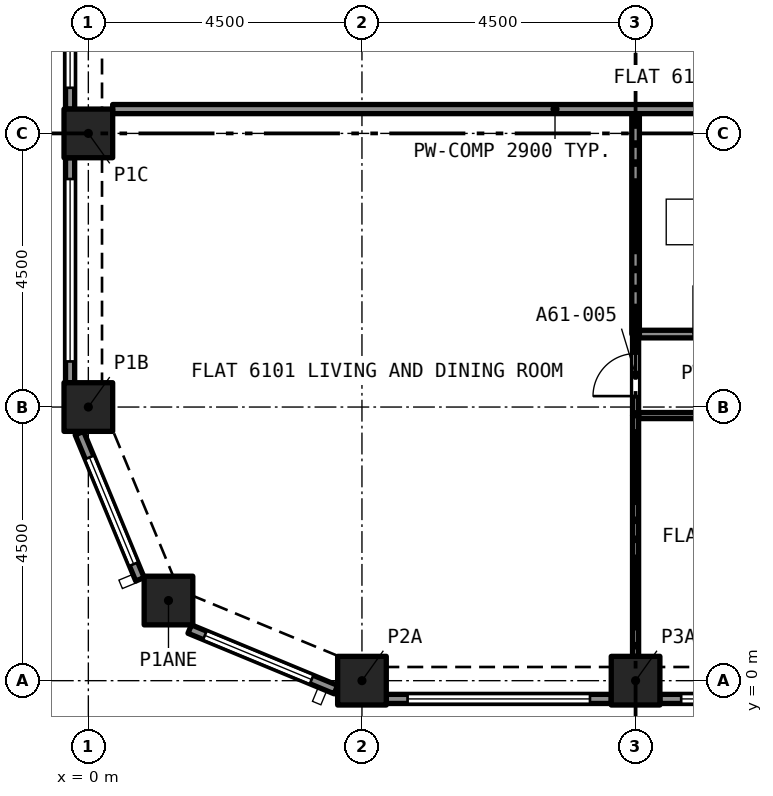
"""IFC4 building model, lengths in metres.
Left out: names, types, materials, properties, quantities, classifications, styles, units other than length and angle.
Written with IfcOpenShell. Run it as: python <this file> out.ifc"""

import sys

from ifc_helpers import new_model, si_unit, direction, frame, frame_2d, origin, origin_2d, place, context, subcontext, project, spatial, rectangle, extrude, element, fill, save


model = new_model("IFC4")
c1 = context("Model", 3, precision=1e-05, world=origin(), true_north=direction((0.0, 1.0)))
c2 = subcontext(c1, "Body", "Model", "MODEL_VIEW")
j1 = project(units=[si_unit("LENGTHUNIT", "METRE"), si_unit("PLANEANGLEUNIT", "RADIAN")], contexts=[c1])
p1 = place(None, origin())
s1 = spatial("IfcSite", under=j1, at=p1, CompositionType="ELEMENT")
p2 = place(p1, origin())
s2 = spatial("IfcBuilding", under=s1, at=p2, CompositionType="ELEMENT")
p3 = place(p2, frame((0.0, 0.0, 219.695)))
s3 = spatial("IfcBuildingStorey", under=s2, at=p3, CompositionType="ELEMENT", Elevation=219.695)
for number, where, z_axis, x_axis in (
    (1, (4.5, 0.0, 0.0), (0.0, 0.0, 1.0), (1.0, 0.0, 0.0)),
    (2, (9.0, 0.0, 0.0), (0.0, 0.0, 1.0), (1.0, 0.0, 0.0)),
    (3, (1.318, 1.318, 0.0), (0.0, 0.0, 1.0), (1.0, 0.0, 0.0)),
    (4, (0.0, 4.5, 0.0), (0.0, 0.0, 1.0), (1.0, 0.0, 0.0)),
    (5, (0.0, 9.0, 0.0), (0.0, 0.0, 1.0), (1.0, 0.0, 0.0)),
):
    element("IfcColumn", number, at=place(p3, frame(where, z_axis=z_axis, x_axis=x_axis)), inside=s3, PredefinedType="COLUMN", context=c2, shape_type="SweptSolid", body=[
        extrude(rectangle(XDim=0.8, YDim=0.8, at=origin_2d()), origin(), (0.0, 0.0, 1.0), 3.2),
    ])
p4 = place(p3, frame((-0.3, 9.4, 0.0), z_axis=(0.0, 0.0, 1.0), x_axis=(0.0, 1.0, 0.0)))
e6 = element("IfcWall", 6, at=p4, inside=s3, PredefinedType="SOLIDWALL", context=c2, shape_type="SweptSolid", body=[
    extrude(rectangle(XDim=3.7, YDim=0.15, at=frame_2d((1.85, 0.0))), origin(), (0.0, 0.0, 1.0), 3.2),
])
p5 = place(p4, frame((0.35, 0.0, 0.45)))
e7 = element("IfcOpeningElement", 7, at=p5, cuts=e6, PredefinedType="OPENING", context=c2, shape_type="SweptSolid", body=[
    extrude(rectangle(XDim=3.0, YDim=1.95, at=frame_2d((1.5, 0.975))), frame((0.0, 0.085, 0.0), z_axis=(0.0, -1.0, 0.0), x_axis=(1.0, 0.0, 0.0)), (0.0, 0.0, 1.0), 0.17),
])
p6 = place(p3, frame((-0.3, 4.9, 0.0), z_axis=(0.0, 0.0, 1.0), x_axis=(0.0, 1.0, 0.0)))
e8 = element("IfcWall", 8, at=p6, inside=s3, PredefinedType="SOLIDWALL", context=c2, shape_type="SweptSolid", body=[
    extrude(rectangle(XDim=3.7, YDim=0.15, at=frame_2d((1.85, 0.0))), origin(), (0.0, 0.0, 1.0), 3.2),
])
p7 = place(p6, frame((0.35, 0.0, 0.45)))
e9 = element("IfcOpeningElement", 9, at=p7, cuts=e8, PredefinedType="OPENING", context=c2, shape_type="SweptSolid", body=[
    extrude(rectangle(XDim=3.0, YDim=1.95, at=frame_2d((1.5, 0.975))), frame((0.0, 0.085, 0.0), z_axis=(0.0, -1.0, 0.0), x_axis=(1.0, 0.0, 0.0)), (0.0, 0.0, 1.0), 0.17),
])
p8 = place(p3, frame((0.849, 1.667, 0.0), z_axis=(0.0, 0.0, 1.0), x_axis=(-0.382669406082, 0.923885342263, 0.0)))
e10 = element("IfcWall", 10, at=p8, inside=s3, PredefinedType="SOLIDWALL", context=c2, shape_type="SweptSolid", body=[
    extrude(rectangle(XDim=2.602, YDim=0.15, at=frame_2d((1.301, 0.0))), origin(), (0.0, 0.0, 1.0), 3.2),
])
p9 = place(p8, frame((0.27, 0.0, 0.45)))
e11 = element("IfcOpeningElement", 11, at=p9, cuts=e10, PredefinedType="OPENING", context=c2, shape_type="SweptSolid", body=[
    extrude(rectangle(XDim=1.9, YDim=1.95, at=frame_2d((0.95, 0.975))), frame((0.0, 0.085, 0.0), z_axis=(0.0, -1.0, 0.0), x_axis=(1.0, 0.0, 0.0)), (0.0, 0.0, 1.0), 0.17),
])
p10 = place(p3, frame((4.071, -0.147, 0.0), z_axis=(0.0, 0.0, 1.0), x_axis=(-0.923885342263, 0.382669406082, 0.0)))
e12 = element("IfcWall", 12, at=p10, inside=s3, PredefinedType="SOLIDWALL", context=c2, shape_type="SweptSolid", body=[
    extrude(rectangle(XDim=2.602, YDim=0.15, at=frame_2d((1.301, 0.0))), origin(), (0.0, 0.0, 1.0), 3.2),
])
p11 = place(p10, frame((0.432, 0.0, 0.45)))
e13 = element("IfcOpeningElement", 13, at=p11, cuts=e12, PredefinedType="OPENING", context=c2, shape_type="SweptSolid", body=[
    extrude(rectangle(XDim=1.9, YDim=1.95, at=frame_2d((0.95, 0.975))), frame((0.0, 0.085, 0.0), z_axis=(0.0, -1.0, 0.0), x_axis=(1.0, 0.0, 0.0)), (0.0, 0.0, 1.0), 0.17),
])
p12 = place(p3, frame((8.6, -0.3, 0.0), z_axis=(0.0, 0.0, 1.0), x_axis=(-1.0, 0.0, 0.0)))
e14 = element("IfcWall", 14, at=p12, inside=s3, PredefinedType="SOLIDWALL", context=c2, shape_type="SweptSolid", body=[
    extrude(rectangle(XDim=3.7, YDim=0.15, at=frame_2d((1.85, 0.0))), origin(), (0.0, 0.0, 1.0), 3.2),
])
p13 = place(p12, frame((0.35, 0.0, 0.45)))
e15 = element("IfcOpeningElement", 15, at=p13, cuts=e14, PredefinedType="OPENING", context=c2, shape_type="SweptSolid", body=[
    extrude(rectangle(XDim=3.0, YDim=1.95, at=frame_2d((1.5, 0.975))), frame((0.0, 0.085, 0.0), z_axis=(0.0, -1.0, 0.0), x_axis=(1.0, 0.0, 0.0)), (0.0, 0.0, 1.0), 0.17),
])
p14 = place(p3, frame((13.1, -0.3, 0.0), z_axis=(0.0, 0.0, 1.0), x_axis=(-1.0, 0.0, 0.0)))
e16 = element("IfcWall", 16, at=p14, inside=s3, PredefinedType="SOLIDWALL", context=c2, shape_type="SweptSolid", body=[
    extrude(rectangle(XDim=3.7, YDim=0.15, at=frame_2d((1.85, 0.0))), origin(), (0.0, 0.0, 1.0), 3.2),
])
p15 = place(p14, frame((0.35, 0.0, 0.45)))
e17 = element("IfcOpeningElement", 17, at=p15, cuts=e16, PredefinedType="OPENING", context=c2, shape_type="SweptSolid", body=[
    extrude(rectangle(XDim=3.0, YDim=1.95, at=frame_2d((1.5, 0.975))), frame((0.0, 0.085, 0.0), z_axis=(0.0, -1.0, 0.0), x_axis=(1.0, 0.0, 0.0)), (0.0, 0.0, 1.0), 0.17),
])
p16 = place(p3, frame((9.062, 5.7, 0.0), z_axis=(0.0, 0.0, 1.0), x_axis=(1.0, 0.0, 0.0)))
e18 = element("IfcWall", 18, at=p16, inside=s3, PredefinedType="PARTITIONING", context=c2, shape_type="SweptSolid", body=[
    extrude(rectangle(XDim=2.646, YDim=0.125, at=frame_2d((1.323, 0.0))), origin(), (0.0, 0.0, 1.0), 2.9),
])
p17 = place(p16, frame((0.892, 0.0, 0.0)))
e19 = element("IfcOpeningElement", 19, at=p17, cuts=e18, PredefinedType="OPENING", context=c2, shape_type="SweptSolid", body=[
    extrude(rectangle(XDim=0.8, YDim=2.1, at=frame_2d((0.4, 1.05))), frame((0.0, 0.073, 0.0), z_axis=(0.0, -1.0, 0.0), x_axis=(1.0, 0.0, 0.0)), (0.0, 0.0, 1.0), 0.145),
])
p18 = place(p3, frame((9.0, 5.7, 0.0), z_axis=(0.0, 0.0, 1.0), x_axis=(0.0, 1.0, 0.0)))
e20 = element("IfcWall", 20, at=p18, inside=s3, PredefinedType="PARTITIONING", context=c2, shape_type="SweptSolid", body=[
    extrude(rectangle(XDim=3.625, YDim=0.125, at=frame_2d((1.812, 0.0))), origin(), (0.0, 0.0, 1.0), 2.9),
])
p19 = place(p3, frame((13.5, 4.36, 0.0), z_axis=(0.0, 0.0, 1.0), x_axis=(-1.0, 0.0, 0.0)))
e21 = element("IfcWall", 21, at=p19, inside=s3, PredefinedType="PARTITIONING", context=c2, shape_type="SweptSolid", body=[
    extrude(rectangle(XDim=4.45, YDim=0.1, at=frame_2d((2.225, 0.0))), origin(), (0.0, 0.0, 1.0), 2.9),
])
p20 = place(p19, frame((1.8, 0.0, 0.0)))
e22 = element("IfcOpeningElement", 22, at=p20, cuts=e21, PredefinedType="OPENING", context=c2, shape_type="SweptSolid", body=[
    extrude(rectangle(XDim=0.9, YDim=2.1, at=frame_2d((0.45, 1.05))), frame((0.0, 0.06, 0.0), z_axis=(0.0, -1.0, 0.0), x_axis=(1.0, 0.0, 0.0)), (0.0, 0.0, 1.0), 0.12),
])
p21 = place(p3, frame((9.0, 0.4, 0.0), z_axis=(0.0, 0.0, 1.0), x_axis=(0.0, 1.0, 0.0)))
e23 = element("IfcWall", 23, at=p21, inside=s3, PredefinedType="PARTITIONING", context=c2, shape_type="SweptSolid", body=[
    extrude(rectangle(XDim=3.96, YDim=0.1, at=frame_2d((1.98, 0.0))), origin(), (0.0, 0.0, 1.0), 2.9),
])
p22 = place(p3, frame((9.0, 4.36, 0.0), z_axis=(0.0, 0.0, 1.0), x_axis=(0.0, 1.0, 0.0)))
e24 = element("IfcWall", 24, at=p22, inside=s3, PredefinedType="PARTITIONING", context=c2, shape_type="SweptSolid", body=[
    extrude(rectangle(XDim=1.34, YDim=0.1, at=frame_2d((0.67, 0.0))), origin(), (0.0, 0.0, 1.0), 2.9),
])
p23 = place(p22, frame((0.32, 0.0, 0.0)))
e25 = element("IfcOpeningElement", 25, at=p23, cuts=e24, PredefinedType="OPENING", context=c2, shape_type="SweptSolid", body=[
    extrude(rectangle(XDim=0.7, YDim=2.1, at=frame_2d((0.35, 1.05))), frame((0.0, 0.06, 0.0), z_axis=(0.0, -1.0, 0.0), x_axis=(1.0, 0.0, 0.0)), (0.0, 0.0, 1.0), 0.12),
])
p24 = place(p3, frame((0.4, 9.4, 0.0), z_axis=(0.0, 0.0, 1.0), x_axis=(1.0, 0.0, 0.0)))
e26 = element("IfcWall", 26, at=p24, inside=s3, PredefinedType="PARTITIONING", context=c2, shape_type="SweptSolid", body=[
    extrude(rectangle(XDim=14.55, YDim=0.15, at=frame_2d((7.275, 0.0))), origin(), (0.0, 0.0, 1.0), 2.9),
])
p25 = place(p5, origin())
e27 = element("IfcWindow", 27, at=p25, inside=s3, PartitioningType="SINGLE_PANEL", PredefinedType="WINDOW", context=c2, shape_type="SweptSolid", body=[
    extrude(rectangle(XDim=3.0, YDim=1.95, at=frame_2d((1.5, 0.975))), frame((0.0, 0.03, 0.0), z_axis=(0.0, -1.0, 0.0), x_axis=(1.0, 0.0, 0.0)), (0.0, 0.0, 1.0), 0.06),
])
fill(e7, e27)
p26 = place(p7, origin())
e28 = element("IfcWindow", 28, at=p26, inside=s3, PartitioningType="SINGLE_PANEL", PredefinedType="WINDOW", context=c2, shape_type="SweptSolid", body=[
    extrude(rectangle(XDim=3.0, YDim=1.95, at=frame_2d((1.5, 0.975))), frame((0.0, 0.03, 0.0), z_axis=(0.0, -1.0, 0.0), x_axis=(1.0, 0.0, 0.0)), (0.0, 0.0, 1.0), 0.06),
])
fill(e9, e28)
p27 = place(p9, origin())
e29 = element("IfcWindow", 29, at=p27, inside=s3, PartitioningType="SINGLE_PANEL", PredefinedType="WINDOW", context=c2, shape_type="SweptSolid", body=[
    extrude(rectangle(XDim=1.9, YDim=1.95, at=frame_2d((0.95, 0.975))), frame((0.0, 0.03, 0.0), z_axis=(0.0, -1.0, 0.0), x_axis=(1.0, 0.0, 0.0)), (0.0, 0.0, 1.0), 0.06),
])
fill(e11, e29)
p28 = place(p11, origin())
e30 = element("IfcWindow", 30, at=p28, inside=s3, PartitioningType="SINGLE_PANEL", PredefinedType="WINDOW", context=c2, shape_type="SweptSolid", body=[
    extrude(rectangle(XDim=1.9, YDim=1.95, at=frame_2d((0.95, 0.975))), frame((0.0, 0.03, 0.0), z_axis=(0.0, -1.0, 0.0), x_axis=(1.0, 0.0, 0.0)), (0.0, 0.0, 1.0), 0.06),
])
fill(e13, e30)
p29 = place(p13, origin())
e31 = element("IfcWindow", 31, at=p29, inside=s3, PartitioningType="SINGLE_PANEL", PredefinedType="WINDOW", context=c2, shape_type="SweptSolid", body=[
    extrude(rectangle(XDim=3.0, YDim=1.95, at=frame_2d((1.5, 0.975))), frame((0.0, 0.03, 0.0), z_axis=(0.0, -1.0, 0.0), x_axis=(1.0, 0.0, 0.0)), (0.0, 0.0, 1.0), 0.06),
])
fill(e15, e31)
p30 = place(p15, origin())
e32 = element("IfcWindow", 32, at=p30, inside=s3, PartitioningType="SINGLE_PANEL", PredefinedType="WINDOW", context=c2, shape_type="SweptSolid", body=[
    extrude(rectangle(XDim=3.0, YDim=1.95, at=frame_2d((1.5, 0.975))), frame((0.0, 0.03, 0.0), z_axis=(0.0, -1.0, 0.0), x_axis=(1.0, 0.0, 0.0)), (0.0, 0.0, 1.0), 0.06),
])
fill(e17, e32)
p31 = place(p23, origin())
e33 = element("IfcDoor", 33, at=p31, inside=s3, OperationType="SINGLE_SWING_LEFT", PredefinedType="DOOR", context=c2, shape_type="SweptSolid", body=[
    extrude(rectangle(XDim=0.7, YDim=2.1, at=frame_2d((0.35, 1.05))), frame((0.0, 0.025, 0.0), z_axis=(0.0, -1.0, 0.0), x_axis=(1.0, 0.0, 0.0)), (0.0, 0.0, 1.0), 0.05),
])
fill(e25, e33)
save(model, sys.argv[1])
